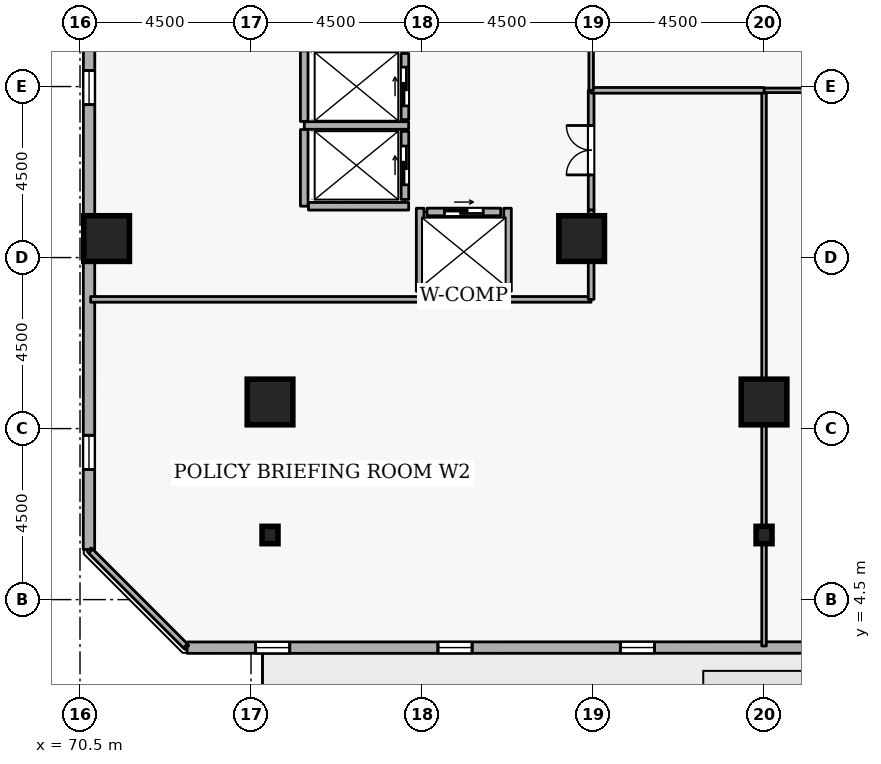
"""IFC4 building model, lengths in metres.
Left out: names, types, materials, properties, quantities, classifications, styles, units other than length and angle.
Written with IfcOpenShell. Run it as: python <this file> out.ifc"""

import sys

from ifc_helpers import new_model, si_unit, direction, frame, frame_2d, origin, origin_2d, place, context, subcontext, project, spatial, rectangle, i_section, extrude, element, fill, save


model = new_model("IFC4")
c1 = context("Model", 3, precision=1e-05, world=origin(), true_north=direction((0.0, 1.0)))
c2 = subcontext(c1, "Body", "Model", "MODEL_VIEW")
j1 = project(units=[si_unit("LENGTHUNIT", "METRE"), si_unit("PLANEANGLEUNIT", "RADIAN")], contexts=[c1])
p1 = place(None, origin())
s1 = spatial("IfcSite", under=j1, at=p1, CompositionType="ELEMENT")
p2 = place(p1, origin())
s2 = spatial("IfcBuilding", under=s1, at=p2, CompositionType="ELEMENT")
p3 = place(p2, frame((0.0, 0.0, 130.5)))
s3 = spatial("IfcBuildingStorey", under=s2, at=p3, CompositionType="ELEMENT", Elevation=130.5)
for number, where, z_axis, x_axis in (
    (1, (71.2, 14.0, 0.0), (0.0, 0.0, 1.0), (1.0, 0.0, 0.0)),
    (2, (88.5, 9.7, 0.0), (0.0, 0.0, 1.0), (1.0, 0.0, 0.0)),
    (3, (75.5, 9.7, 0.0), (0.0, 0.0, 1.0), (1.0, 0.0, 0.0)),
    (4, (83.7, 14.0, 0.0), (0.0, 0.0, 1.0), (1.0, 0.0, 0.0)),
):
    element("IfcColumn", number, at=place(p3, frame(where, z_axis=z_axis, x_axis=x_axis)), inside=s3, PredefinedType="COLUMN", context=c2, shape_type="SweptSolid", body=[
        extrude(rectangle(XDim=1.2, YDim=1.2, at=origin_2d()), origin(), (0.0, 0.0, 1.0), 3.6),
    ])
for number, where, z_axis, x_axis in (
    (5, (88.5, 6.2, 0.0), (0.0, 0.0, 1.0), (1.0, 0.0, 0.0)),
    (6, (75.5, 6.2, 0.0), (0.0, 0.0, 1.0), (1.0, 0.0, 0.0)),
):
    element("IfcColumn", number, at=place(p3, frame(where, z_axis=z_axis, x_axis=x_axis)), inside=s3, PredefinedType="COLUMN", context=c2, shape_type="SweptSolid", body=[
        extrude(i_section(OverallWidth=0.418, OverallDepth=0.456, WebThickness=0.042, FlangeThickness=0.067, FilletRadius=0.015, at=origin_2d()), origin(), (0.0, 0.0, 1.0), 3.6),
    ])
p4 = place(p3, frame((73.319, 3.235, 0.0), z_axis=(0.0, 0.0, 1.0), x_axis=(0.999999963872, 0.000268805477, 0.0)))
e7 = element("IfcWall", 7, at=p4, inside=s3, PredefinedType="STANDARD", context=c2, shape_type="SweptSolid", body=[
    extrude(rectangle(XDim=33.605, YDim=0.3, at=frame_2d((16.802, 0.0))), origin(), (0.0, 0.0, 1.0), 2.7),
])
p5 = place(p4, frame((18.603, 0.0, 0.0)))
e8 = element("IfcOpeningElement", 8, at=p5, cuts=e7, PredefinedType="OPENING", context=c2, shape_type="SweptSolid", body=[
    extrude(rectangle(XDim=1.0, YDim=2.08, at=frame_2d((0.5, 1.04))), frame((0.0, 0.16, 0.0), z_axis=(0.0, -1.0, 0.0), x_axis=(1.0, 0.0, 0.0)), (0.0, 0.0, 1.0), 0.32),
])
p6 = place(p4, frame((1.8, 0.0, 0.72)))
e9 = element("IfcOpeningElement", 9, at=p6, cuts=e7, PredefinedType="OPENING", context=c2, shape_type="SweptSolid", body=[
    extrude(rectangle(XDim=0.9, YDim=1.75, at=frame_2d((0.45, 0.875))), frame((0.0, 0.16, 0.0), z_axis=(0.0, -1.0, 0.0), x_axis=(1.0, 0.0, 0.0)), (0.0, 0.0, 1.0), 0.32),
])
p7 = place(p4, frame((6.6, 0.0, 0.72)))
e10 = element("IfcOpeningElement", 10, at=p7, cuts=e7, PredefinedType="OPENING", context=c2, shape_type="SweptSolid", body=[
    extrude(rectangle(XDim=0.9, YDim=1.75, at=frame_2d((0.45, 0.875))), frame((0.0, 0.16, 0.0), z_axis=(0.0, -1.0, 0.0), x_axis=(1.0, 0.0, 0.0)), (0.0, 0.0, 1.0), 0.32),
])
p8 = place(p4, frame((11.4, 0.0, 0.72)))
e11 = element("IfcOpeningElement", 11, at=p8, cuts=e7, PredefinedType="OPENING", context=c2, shape_type="SweptSolid", body=[
    extrude(rectangle(XDim=0.9, YDim=1.75, at=frame_2d((0.45, 0.875))), frame((0.0, 0.16, 0.0), z_axis=(0.0, -1.0, 0.0), x_axis=(1.0, 0.0, 0.0)), (0.0, 0.0, 1.0), 0.32),
])
p9 = place(p4, frame((16.2, 0.0, 0.72)))
e12 = element("IfcOpeningElement", 12, at=p9, cuts=e7, PredefinedType="OPENING", context=c2, shape_type="SweptSolid", body=[
    extrude(rectangle(XDim=0.9, YDim=1.75, at=frame_2d((0.45, 0.875))), frame((0.0, 0.16, 0.0), z_axis=(0.0, -1.0, 0.0), x_axis=(1.0, 0.0, 0.0)), (0.0, 0.0, 1.0), 0.32),
])
p10 = place(p4, frame((21.0, 0.0, 0.72)))
e13 = element("IfcOpeningElement", 13, at=p10, cuts=e7, PredefinedType="OPENING", context=c2, shape_type="SweptSolid", body=[
    extrude(rectangle(XDim=0.9, YDim=1.75, at=frame_2d((0.45, 0.875))), frame((0.0, 0.16, 0.0), z_axis=(0.0, -1.0, 0.0), x_axis=(1.0, 0.0, 0.0)), (0.0, 0.0, 1.0), 0.32),
])
p11 = place(p4, frame((25.8, 0.0, 0.72)))
e14 = element("IfcOpeningElement", 14, at=p11, cuts=e7, PredefinedType="OPENING", context=c2, shape_type="SweptSolid", body=[
    extrude(rectangle(XDim=0.9, YDim=1.75, at=frame_2d((0.45, 0.875))), frame((0.0, 0.16, 0.0), z_axis=(0.0, -1.0, 0.0), x_axis=(1.0, 0.0, 0.0)), (0.0, 0.0, 1.0), 0.32),
])
p12 = place(p4, frame((30.6, 0.0, 0.72)))
e15 = element("IfcOpeningElement", 15, at=p12, cuts=e7, PredefinedType="OPENING", context=c2, shape_type="SweptSolid", body=[
    extrude(rectangle(XDim=0.9, YDim=1.75, at=frame_2d((0.45, 0.875))), frame((0.0, 0.16, 0.0), z_axis=(0.0, -1.0, 0.0), x_axis=(1.0, 0.0, 0.0)), (0.0, 0.0, 1.0), 0.32),
])
p13 = place(p3, frame((70.744, 39.424, 0.0), z_axis=(0.0, 0.0, 1.0), x_axis=(-0.000268805477, -0.999999963872, 0.0)))
e16 = element("IfcWall", 16, at=p13, inside=s3, PredefinedType="STANDARD", context=c2, shape_type="SweptSolid", body=[
    extrude(rectangle(XDim=33.605, YDim=0.3, at=frame_2d((16.802, 0.0))), origin(), (0.0, 0.0, 1.0), 2.7),
])
p14 = place(p13, frame((6.6, 0.0, 0.72)))
e17 = element("IfcOpeningElement", 17, at=p14, cuts=e16, PredefinedType="OPENING", context=c2, shape_type="SweptSolid", body=[
    extrude(rectangle(XDim=0.9, YDim=1.75, at=frame_2d((0.45, 0.875))), frame((0.0, 0.16, 0.0), z_axis=(0.0, -1.0, 0.0), x_axis=(1.0, 0.0, 0.0)), (0.0, 0.0, 1.0), 0.32),
])
p15 = place(p13, frame((16.2, 0.0, 0.72)))
e18 = element("IfcOpeningElement", 18, at=p15, cuts=e16, PredefinedType="OPENING", context=c2, shape_type="SweptSolid", body=[
    extrude(rectangle(XDim=0.9, YDim=1.75, at=frame_2d((0.45, 0.875))), frame((0.0, 0.16, 0.0), z_axis=(0.0, -1.0, 0.0), x_axis=(1.0, 0.0, 0.0)), (0.0, 0.0, 1.0), 0.32),
])
p16 = place(p13, frame((21.0, 0.0, 0.72)))
e19 = element("IfcOpeningElement", 19, at=p16, cuts=e16, PredefinedType="OPENING", context=c2, shape_type="SweptSolid", body=[
    extrude(rectangle(XDim=0.9, YDim=1.75, at=frame_2d((0.45, 0.875))), frame((0.0, 0.16, 0.0), z_axis=(0.0, -1.0, 0.0), x_axis=(1.0, 0.0, 0.0)), (0.0, 0.0, 1.0), 0.32),
])
p17 = place(p13, frame((30.6, 0.0, 0.72)))
e20 = element("IfcOpeningElement", 20, at=p17, cuts=e16, PredefinedType="OPENING", context=c2, shape_type="SweptSolid", body=[
    extrude(rectangle(XDim=0.9, YDim=1.75, at=frame_2d((0.45, 0.875))), frame((0.0, 0.16, 0.0), z_axis=(0.0, -1.0, 0.0), x_axis=(1.0, 0.0, 0.0)), (0.0, 0.0, 1.0), 0.32),
])
p18 = place(p3, frame((79.05, 17.13, 0.0), z_axis=(0.0, 0.0, 1.0), x_axis=(0.0, 1.0, 0.0)))
e21 = element("IfcWall", 21, at=p18, inside=s3, PredefinedType="STANDARD", context=c2, shape_type="SweptSolid", body=[
    extrude(rectangle(XDim=1.74, YDim=0.2, at=frame_2d((0.87, 0.0))), origin(), (0.0, 0.0, 1.0), 3.34),
])
p19 = place(p18, frame((0.36, 0.0, 0.0)))
e22 = element("IfcOpeningElement", 22, at=p19, cuts=e21, PredefinedType="OPENING", context=c2, shape_type="SweptSolid", body=[
    extrude(rectangle(XDim=1.02, YDim=2.06, at=frame_2d((0.51, 1.03))), frame((0.0, 0.11, 0.0), z_axis=(0.0, -1.0, 0.0), x_axis=(1.0, 0.0, 0.0)), (0.0, 0.0, 1.0), 0.22),
])
p20 = place(p3, frame((79.05, 15.03, 0.0), z_axis=(0.0, 0.0, 1.0), x_axis=(0.0, 1.0, 0.0)))
e23 = element("IfcWall", 23, at=p20, inside=s3, PredefinedType="STANDARD", context=c2, shape_type="SweptSolid", body=[
    extrude(rectangle(XDim=1.79, YDim=0.2, at=frame_2d((0.895, 0.0))), origin(), (0.0, 0.0, 1.0), 3.34),
])
p21 = place(p20, frame((0.385, 0.0, 0.0)))
e24 = element("IfcOpeningElement", 24, at=p21, cuts=e23, PredefinedType="OPENING", context=c2, shape_type="SweptSolid", body=[
    extrude(rectangle(XDim=1.02, YDim=2.06, at=frame_2d((0.51, 1.03))), frame((0.0, 0.11, 0.0), z_axis=(0.0, -1.0, 0.0), x_axis=(1.0, 0.0, 0.0)), (0.0, 0.0, 1.0), 0.22),
])
p22 = place(p3, frame((79.63, 14.7, 0.0), z_axis=(0.0, 0.0, 1.0), x_axis=(1.0, 0.0, 0.0)))
e25 = element("IfcWall", 25, at=p22, inside=s3, PredefinedType="STANDARD", context=c2, shape_type="SweptSolid", body=[
    extrude(rectangle(XDim=1.94, YDim=0.2, at=frame_2d((0.97, 0.0))), origin(), (0.0, 0.0, 1.0), 3.34),
])
p23 = place(p22, frame((0.46, 0.0, 0.0)))
e26 = element("IfcOpeningElement", 26, at=p23, cuts=e25, PredefinedType="OPENING", context=c2, shape_type="SweptSolid", body=[
    extrude(rectangle(XDim=1.02, YDim=2.06, at=frame_2d((0.51, 1.03))), frame((0.0, 0.11, 0.0), z_axis=(0.0, -1.0, 0.0), x_axis=(1.0, 0.0, 0.0)), (0.0, 0.0, 1.0), 0.22),
])
p24 = place(p3, frame((76.402, 16.975, 0.0), z_axis=(0.0, 0.0, 1.0), x_axis=(1.0, 0.0, 0.0)))
e27 = element("IfcWall", 27, at=p24, inside=s3, PredefinedType="STANDARD", context=c2, shape_type="SweptSolid", body=[
    extrude(rectangle(XDim=2.746, YDim=0.2, at=frame_2d((1.373, 0.0))), origin(), (0.0, 0.0, 1.0), 3.34),
])
p25 = place(p3, frame((76.4, 14.852, 0.0), z_axis=(0.0, 0.0, 1.0), x_axis=(0.0, 1.0, 0.0)))
e28 = element("IfcWall", 28, at=p25, inside=s3, PredefinedType="STANDARD", context=c2, shape_type="SweptSolid", body=[
    extrude(rectangle(XDim=2.016, YDim=0.2, at=frame_2d((1.008, 0.0))), origin(), (0.0, 0.0, 1.0), 3.34),
])
p26 = place(p3, frame((76.4, 17.082, 0.0), z_axis=(0.0, 0.0, 1.0), x_axis=(0.0, 1.0, 0.0)))
e29 = element("IfcWall", 29, at=p26, inside=s3, PredefinedType="STANDARD", context=c2, shape_type="SweptSolid", body=[
    extrude(rectangle(XDim=1.856, YDim=0.2, at=frame_2d((0.928, 0.0))), origin(), (0.0, 0.0, 1.0), 3.34),
])
p27 = place(p3, frame((76.512, 14.85, 0.0), z_axis=(0.0, 0.0, 1.0), x_axis=(1.0, 0.0, 0.0)))
e30 = element("IfcWall", 30, at=p27, inside=s3, PredefinedType="STANDARD", context=c2, shape_type="SweptSolid", body=[
    extrude(rectangle(XDim=2.636, YDim=0.2, at=frame_2d((1.318, 0.0))), origin(), (0.0, 0.0, 1.0), 3.34),
])
p28 = place(p3, frame((79.452, 12.5, 0.0), z_axis=(0.0, 0.0, 1.0), x_axis=(1.0, 0.0, 0.0)))
e31 = element("IfcWall", 31, at=p28, inside=s3, PredefinedType="STANDARD", context=c2, shape_type="SweptSolid", body=[
    extrude(rectangle(XDim=2.296, YDim=0.2, at=frame_2d((1.148, 0.0))), origin(), (0.0, 0.0, 1.0), 3.34),
])
for number, where, z_axis, x_axis in (
    (32, (81.75, 12.612, 0.0), (0.0, 0.0, 1.0), (0.0, 1.0, 0.0)),
    (33, (79.45, 12.612, 0.0), (0.0, 0.0, 1.0), (0.0, 1.0, 0.0)),
):
    element("IfcWall", number, at=place(p3, frame(where, z_axis=z_axis, x_axis=x_axis)), inside=s3, PredefinedType="STANDARD", context=c2, shape_type="SweptSolid", body=[
        extrude(rectangle(XDim=2.186, YDim=0.2, at=frame_2d((1.093, 0.0))), origin(), (0.0, 0.0, 1.0), 3.34),
    ])
p29 = place(p3, frame((88.5, 3.28, 0.0), z_axis=(0.0, 0.0, 1.0), x_axis=(0.0, 1.0, 0.0)))
e34 = element("IfcWall", 34, at=p29, inside=s3, PredefinedType="PARTITIONING", context=c2, shape_type="SweptSolid", body=[
    extrude(rectangle(XDim=14.62, YDim=0.12, at=frame_2d((7.31, 0.0))), origin(), (0.0, 0.0, 1.0), 2.878),
])
p30 = place(p3, frame((88.5, 17.9, 0.0), z_axis=(0.0, 0.0, 1.0), x_axis=(1.0, 0.0, 0.0)))
e35 = element("IfcWall", 35, at=p30, inside=s3, PredefinedType="PARTITIONING", context=c2, shape_type="SweptSolid", body=[
    extrude(rectangle(XDim=4.55, YDim=0.12, at=frame_2d((2.275, 0.0))), origin(), (0.0, 0.0, 1.0), 3.34),
])
p31 = place(p3, frame((83.95, 14.75, 0.0), z_axis=(0.0, 0.0, 1.0), x_axis=(0.0, 1.0, 0.0)))
e36 = element("IfcWall", 36, at=p31, inside=s3, PredefinedType="PARTITIONING", context=c2, shape_type="SweptSolid", body=[
    extrude(rectangle(XDim=3.15, YDim=0.15, at=frame_2d((1.575, 0.0))), origin(), (0.0, 0.0, 1.0), 3.34),
])
p32 = place(p31, frame((0.925, 0.0, 0.0)))
e37 = element("IfcOpeningElement", 37, at=p32, cuts=e36, PredefinedType="OPENING", context=c2, shape_type="SweptSolid", body=[
    extrude(rectangle(XDim=1.3, YDim=2.12, at=frame_2d((0.65, 1.06))), frame((0.0, 0.085, 0.0), z_axis=(0.0, -1.0, 0.0), x_axis=(1.0, 0.0, 0.0)), (0.0, 0.0, 1.0), 0.17),
])
p33 = place(p3, frame((83.95, 17.9, 0.0), z_axis=(0.0, 0.0, 1.0), x_axis=(1.0, 0.0, 0.0)))
e38 = element("IfcWall", 38, at=p33, inside=s3, PredefinedType="PARTITIONING", context=c2, shape_type="SweptSolid", body=[
    extrude(rectangle(XDim=4.55, YDim=0.15, at=frame_2d((2.275, 0.0))), origin(), (0.0, 0.0, 1.0), 3.34),
])
p34 = place(p3, frame((73.275, 3.28, 0.0), z_axis=(0.0, 0.0, 1.0), x_axis=(-0.707106781187, 0.707106781187, 0.0)))
e39 = element("IfcWall", 39, at=p34, inside=s3, PredefinedType="PARTITIONING", context=c2, shape_type="SweptSolid", body=[
    extrude(rectangle(XDim=3.528, YDim=0.15, at=frame_2d((1.764, 0.0))), origin(), (0.0, 0.0, 1.0), 3.34),
])
p35 = place(p3, frame((70.78, 12.4, 0.0), z_axis=(0.0, 0.0, 1.0), x_axis=(1.0, 0.0, 0.0)))
e40 = element("IfcWall", 40, at=p35, inside=s3, PredefinedType="PARTITIONING", context=c2, shape_type="SweptSolid", body=[
    extrude(rectangle(XDim=8.672, YDim=0.15, at=frame_2d((4.336, 0.0))), origin(), (0.0, 0.0, 1.0), 3.34),
])
p36 = place(p3, frame((81.748, 12.4, 0.0), z_axis=(0.0, 0.0, 1.0), x_axis=(1.0, 0.0, 0.0)))
e41 = element("IfcWall", 41, at=p36, inside=s3, PredefinedType="PARTITIONING", context=c2, shape_type="SweptSolid", body=[
    extrude(rectangle(XDim=2.202, YDim=0.15, at=frame_2d((1.101, 0.0))), origin(), (0.0, 0.0, 1.0), 3.34),
])
p37 = place(p3, frame((83.95, 12.4, 0.0), z_axis=(0.0, 0.0, 1.0), x_axis=(0.0, 1.0, 0.0)))
e42 = element("IfcWall", 42, at=p37, inside=s3, PredefinedType="PARTITIONING", context=c2, shape_type="SweptSolid", body=[
    extrude(rectangle(XDim=2.35, YDim=0.15, at=frame_2d((1.175, 0.0))), origin(), (0.0, 0.0, 1.0), 3.34),
])
p38 = place(p3, frame((83.95, 17.9, 0.0), z_axis=(0.0, 0.0, 1.0), x_axis=(0.0, 1.0, 0.0)))
e43 = element("IfcWall", 43, at=p38, inside=s3, PredefinedType="PARTITIONING", context=c2, shape_type="SweptSolid", body=[
    extrude(rectangle(XDim=4.5, YDim=0.12, at=frame_2d((2.25, 0.0))), origin(), (0.0, 0.0, 1.0), 3.34),
])
p39 = place(p38, frame((1.775, 0.0, 0.0)))
e44 = element("IfcOpeningElement", 44, at=p39, cuts=e43, PredefinedType="OPENING", context=c2, shape_type="SweptSolid", body=[
    extrude(rectangle(XDim=0.95, YDim=2.1, at=frame_2d((0.475, 1.05))), frame((0.0, 0.07, 0.0), z_axis=(0.0, -1.0, 0.0), x_axis=(1.0, 0.0, 0.0)), (0.0, 0.0, 1.0), 0.14),
])
p40 = place(p6, origin())
e45 = element("IfcWindow", 45, at=p40, inside=s3, PartitioningType="SINGLE_PANEL", PredefinedType="WINDOW", context=c2, shape_type="SweptSolid", body=[
    extrude(rectangle(XDim=0.9, YDim=1.75, at=frame_2d((0.45, 0.875))), frame((0.0, 0.03, 0.0), z_axis=(0.0, -1.0, 0.0), x_axis=(1.0, 0.0, 0.0)), (0.0, 0.0, 1.0), 0.06),
])
fill(e9, e45)
p41 = place(p7, origin())
e46 = element("IfcWindow", 46, at=p41, inside=s3, PartitioningType="SINGLE_PANEL", PredefinedType="WINDOW", context=c2, shape_type="SweptSolid", body=[
    extrude(rectangle(XDim=0.9, YDim=1.75, at=frame_2d((0.45, 0.875))), frame((0.0, 0.03, 0.0), z_axis=(0.0, -1.0, 0.0), x_axis=(1.0, 0.0, 0.0)), (0.0, 0.0, 1.0), 0.06),
])
fill(e10, e46)
p42 = place(p8, origin())
e47 = element("IfcWindow", 47, at=p42, inside=s3, PartitioningType="SINGLE_PANEL", PredefinedType="WINDOW", context=c2, shape_type="SweptSolid", body=[
    extrude(rectangle(XDim=0.9, YDim=1.75, at=frame_2d((0.45, 0.875))), frame((0.0, 0.03, 0.0), z_axis=(0.0, -1.0, 0.0), x_axis=(1.0, 0.0, 0.0)), (0.0, 0.0, 1.0), 0.06),
])
fill(e11, e47)
p43 = place(p16, origin())
e48 = element("IfcWindow", 48, at=p43, inside=s3, PartitioningType="SINGLE_PANEL", PredefinedType="WINDOW", context=c2, shape_type="SweptSolid", body=[
    extrude(rectangle(XDim=0.9, YDim=1.75, at=frame_2d((0.45, 0.875))), frame((0.0, 0.03, 0.0), z_axis=(0.0, -1.0, 0.0), x_axis=(1.0, 0.0, 0.0)), (0.0, 0.0, 1.0), 0.06),
])
fill(e19, e48)
p44 = place(p17, origin())
e49 = element("IfcWindow", 49, at=p44, inside=s3, PartitioningType="SINGLE_PANEL", PredefinedType="WINDOW", context=c2, shape_type="SweptSolid", body=[
    extrude(rectangle(XDim=0.9, YDim=1.75, at=frame_2d((0.45, 0.875))), frame((0.0, 0.03, 0.0), z_axis=(0.0, -1.0, 0.0), x_axis=(1.0, 0.0, 0.0)), (0.0, 0.0, 1.0), 0.06),
])
fill(e20, e49)
p45 = place(p19, origin())
e50 = element("IfcDoor", 50, at=p45, inside=s3, OperationType="SLIDING_TO_LEFT", PredefinedType="DOOR", context=c2, shape_type="SweptSolid", body=[
    extrude(rectangle(XDim=1.02, YDim=2.06, at=frame_2d((0.51, 1.03))), frame((0.0, 0.025, 0.0), z_axis=(0.0, -1.0, 0.0), x_axis=(1.0, 0.0, 0.0)), (0.0, 0.0, 1.0), 0.05),
])
fill(e22, e50)
p46 = place(p21, origin())
e51 = element("IfcDoor", 51, at=p46, inside=s3, OperationType="SLIDING_TO_LEFT", PredefinedType="DOOR", context=c2, shape_type="SweptSolid", body=[
    extrude(rectangle(XDim=1.02, YDim=2.06, at=frame_2d((0.51, 1.03))), frame((0.0, 0.025, 0.0), z_axis=(0.0, -1.0, 0.0), x_axis=(1.0, 0.0, 0.0)), (0.0, 0.0, 1.0), 0.05),
])
fill(e24, e51)
p47 = place(p23, origin())
e52 = element("IfcDoor", 52, at=p47, inside=s3, OperationType="SLIDING_TO_LEFT", PredefinedType="DOOR", context=c2, shape_type="SweptSolid", body=[
    extrude(rectangle(XDim=1.02, YDim=2.06, at=frame_2d((0.51, 1.03))), frame((0.0, 0.025, 0.0), z_axis=(0.0, -1.0, 0.0), x_axis=(1.0, 0.0, 0.0)), (0.0, 0.0, 1.0), 0.05),
])
fill(e26, e52)
p48 = place(p32, origin())
e53 = element("IfcDoor", 53, at=p48, inside=s3, OperationType="DOUBLE_DOOR_SINGLE_SWING", PredefinedType="DOOR", context=c2, shape_type="SweptSolid", body=[
    extrude(rectangle(XDim=1.3, YDim=2.12, at=frame_2d((0.65, 1.06))), frame((0.0, 0.025, 0.0), z_axis=(0.0, -1.0, 0.0), x_axis=(1.0, 0.0, 0.0)), (0.0, 0.0, 1.0), 0.05),
])
fill(e37, e53)
save(model, sys.argv[1])
